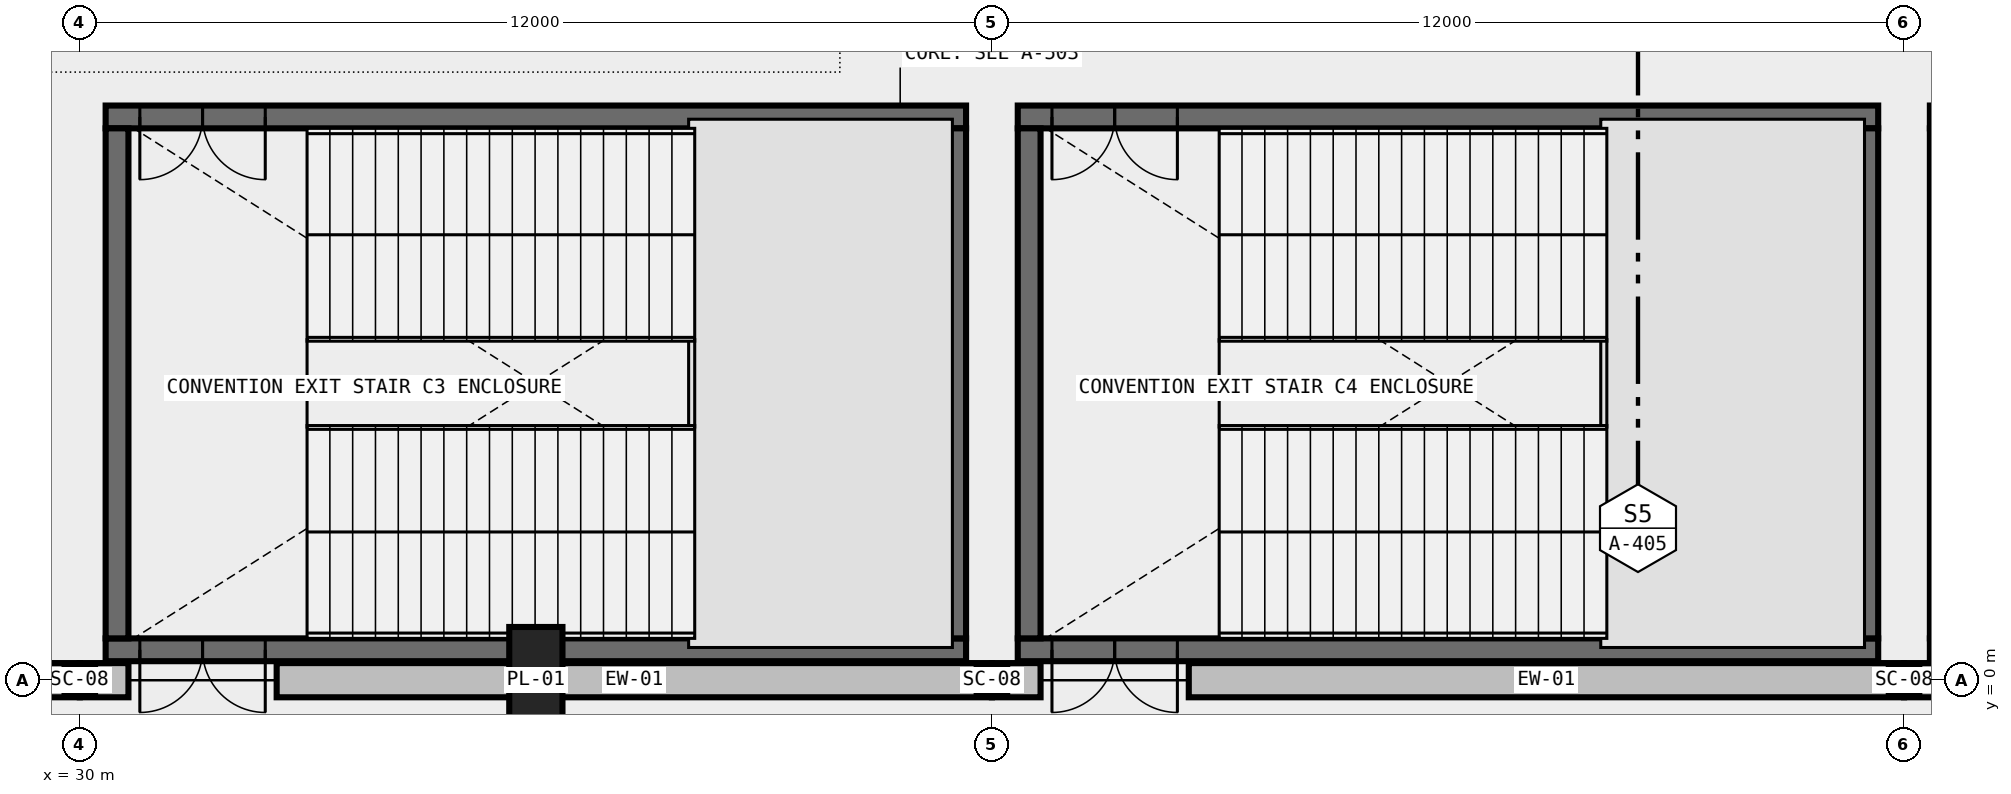
"""IFC4 building model, lengths in metres.
Left out: names, types, materials, properties, quantities, classifications, styles, units other than length and angle.
Written with IfcOpenShell. Run it as: python <this file> out.ifc"""

import sys

from ifc_helpers import new_model, si_unit, direction, frame, frame_2d, origin, origin_2d, place, context, subcontext, project, spatial, rectangle, i_section, extrude, element, fill, save


model = new_model("IFC4")
c1 = context("Model", 3, precision=1e-05, world=origin(), true_north=direction((0.0, 1.0)))
c2 = subcontext(c1, "Body", "Model", "MODEL_VIEW")
j1 = project(units=[si_unit("LENGTHUNIT", "METRE"), si_unit("PLANEANGLEUNIT", "RADIAN")], contexts=[c1])
p1 = place(None, origin())
s1 = spatial("IfcSite", under=j1, at=p1, CompositionType="ELEMENT")
p2 = place(p1, origin())
s2 = spatial("IfcBuilding", under=s1, at=p2, CompositionType="ELEMENT")
p3 = place(p2, origin())
s3 = spatial("IfcBuildingStorey", under=s2, at=p3, CompositionType="ELEMENT", Elevation=0.0)
for number, where, z_axis, x_axis in (
    (1, (30.0, 0.0, 0.0), (0.0, 0.0, 1.0), (1.0, 0.0, 0.0)),
    (2, (42.0, 0.0, 0.0), (0.0, 0.0, 1.0), (1.0, 0.0, 0.0)),
    (3, (54.0, 0.0, 0.0), (0.0, 0.0, 1.0), (1.0, 0.0, 0.0)),
):
    element("IfcColumn", number, at=place(p3, frame(where, z_axis=z_axis, x_axis=x_axis)), inside=s3, PredefinedType="COLUMN", context=c2, shape_type="SweptSolid", body=[
        extrude(i_section(OverallWidth=0.401, OverallDepth=0.399, WebThickness=0.025, FlangeThickness=0.04, FilletRadius=0.031, at=origin_2d()), origin(), (0.0, 0.0, 1.0), 6.0),
    ])
p4 = place(p3, frame((36.0, 0.0, 0.0), z_axis=(0.0, 0.0, 1.0), x_axis=(1.0, 0.0, 0.0)))
e4 = element("IfcColumn", 4, at=p4, inside=s3, PredefinedType="PILASTER", context=c2, shape_type="SweptSolid", body=[
    extrude(rectangle(XDim=0.7, YDim=1.4, at=origin_2d()), origin(), (0.0, 0.0, 1.0), 6.0),
])
p5 = place(p3, frame((41.66, 0.4, 0.0), z_axis=(0.0, 0.0, 1.0), x_axis=(-1.0, 0.0, 0.0)))
e5 = element("IfcWall", 5, at=p5, inside=s3, PredefinedType="SHEAR", context=c2, shape_type="SweptSolid", body=[
    extrude(rectangle(XDim=11.32, YDim=0.3, at=frame_2d((5.66, 0.0))), origin(), (0.0, 0.0, 1.0), 6.0),
])
p6 = place(p5, frame((9.22, 0.0, 0.0)))
e6 = element("IfcOpeningElement", 6, at=p6, cuts=e5, PredefinedType="OPENING", context=c2, shape_type="SweptSolid", body=[
    extrude(rectangle(XDim=1.65, YDim=2.25, at=frame_2d((0.825, 1.125))), frame((0.0, 0.165, 0.0), z_axis=(0.0, -1.0, 0.0), x_axis=(1.0, 0.0, 0.0)), (0.0, 0.0, 1.0), 0.33),
])
p7 = place(p3, frame((41.66, 7.41, 0.0), z_axis=(0.0, 0.0, 1.0), x_axis=(-1.0, 0.0, 0.0)))
e7 = element("IfcWall", 7, at=p7, inside=s3, PredefinedType="SHEAR", context=c2, shape_type="SweptSolid", body=[
    extrude(rectangle(XDim=11.32, YDim=0.3, at=frame_2d((5.66, 0.0))), origin(), (0.0, 0.0, 1.0), 6.0),
])
p8 = place(p7, frame((9.22, 0.0, 0.0)))
e8 = element("IfcOpeningElement", 8, at=p8, cuts=e7, PredefinedType="OPENING", context=c2, shape_type="SweptSolid", body=[
    extrude(rectangle(XDim=1.65, YDim=2.25, at=frame_2d((0.825, 1.125))), frame((0.0, 0.165, 0.0), z_axis=(0.0, -1.0, 0.0), x_axis=(1.0, 0.0, 0.0)), (0.0, 0.0, 1.0), 0.33),
])
for number, where, z_axis, x_axis in (
    (9, (30.49, 7.26, 0.0), (0.0, 0.0, 1.0), (0.0, -1.0, 0.0)),
    (10, (41.51, 0.55, 0.0), (0.0, 0.0, 1.0), (0.0, 1.0, 0.0)),
):
    element("IfcWall", number, at=place(p3, frame(where, z_axis=z_axis, x_axis=x_axis)), inside=s3, PredefinedType="SHEAR", context=c2, shape_type="SweptSolid", body=[
        extrude(rectangle(XDim=6.71, YDim=0.3, at=frame_2d((3.355, 0.0))), origin(), (0.0, 0.0, 1.0), 6.0),
    ])
p9 = place(p3, frame((53.66, 0.4, 0.0), z_axis=(0.0, 0.0, 1.0), x_axis=(-1.0, 0.0, 0.0)))
e11 = element("IfcWall", 11, at=p9, inside=s3, PredefinedType="SHEAR", context=c2, shape_type="SweptSolid", body=[
    extrude(rectangle(XDim=11.32, YDim=0.3, at=frame_2d((5.66, 0.0))), origin(), (0.0, 0.0, 1.0), 6.0),
])
p10 = place(p9, frame((9.22, 0.0, 0.0)))
e12 = element("IfcOpeningElement", 12, at=p10, cuts=e11, PredefinedType="OPENING", context=c2, shape_type="SweptSolid", body=[
    extrude(rectangle(XDim=1.65, YDim=2.25, at=frame_2d((0.825, 1.125))), frame((0.0, 0.165, 0.0), z_axis=(0.0, -1.0, 0.0), x_axis=(1.0, 0.0, 0.0)), (0.0, 0.0, 1.0), 0.33),
])
p11 = place(p3, frame((53.66, 7.41, 0.0), z_axis=(0.0, 0.0, 1.0), x_axis=(-1.0, 0.0, 0.0)))
e13 = element("IfcWall", 13, at=p11, inside=s3, PredefinedType="SHEAR", context=c2, shape_type="SweptSolid", body=[
    extrude(rectangle(XDim=11.32, YDim=0.3, at=frame_2d((5.66, 0.0))), origin(), (0.0, 0.0, 1.0), 6.0),
])
p12 = place(p11, frame((9.22, 0.0, 0.0)))
e14 = element("IfcOpeningElement", 14, at=p12, cuts=e13, PredefinedType="OPENING", context=c2, shape_type="SweptSolid", body=[
    extrude(rectangle(XDim=1.65, YDim=2.25, at=frame_2d((0.825, 1.125))), frame((0.0, 0.165, 0.0), z_axis=(0.0, -1.0, 0.0), x_axis=(1.0, 0.0, 0.0)), (0.0, 0.0, 1.0), 0.33),
])
for number, where, z_axis, x_axis in (
    (15, (42.49, 7.26, 0.0), (0.0, 0.0, 1.0), (0.0, -1.0, 0.0)),
    (16, (53.51, 0.55, 0.0), (0.0, 0.0, 1.0), (0.0, 1.0, 0.0)),
):
    element("IfcWall", number, at=place(p3, frame(where, z_axis=z_axis, x_axis=x_axis)), inside=s3, PredefinedType="SHEAR", context=c2, shape_type="SweptSolid", body=[
        extrude(rectangle(XDim=6.71, YDim=0.3, at=frame_2d((3.355, 0.0))), origin(), (0.0, 0.0, 1.0), 6.0),
    ])
p13 = place(p3, frame((65.66, 0.4, 0.0), z_axis=(0.0, 0.0, 1.0), x_axis=(-1.0, 0.0, 0.0)))
e17 = element("IfcWall", 17, at=p13, inside=s3, PredefinedType="SHEAR", context=c2, shape_type="SweptSolid", body=[
    extrude(rectangle(XDim=11.32, YDim=0.3, at=frame_2d((5.66, 0.0))), origin(), (0.0, 0.0, 1.0), 6.0),
])
p14 = place(p13, frame((9.22, 0.0, 0.0)))
e18 = element("IfcOpeningElement", 18, at=p14, cuts=e17, PredefinedType="OPENING", context=c2, shape_type="SweptSolid", body=[
    extrude(rectangle(XDim=1.65, YDim=2.25, at=frame_2d((0.825, 1.125))), frame((0.0, 0.165, 0.0), z_axis=(0.0, -1.0, 0.0), x_axis=(1.0, 0.0, 0.0)), (0.0, 0.0, 1.0), 0.33),
])
p15 = place(p3, frame((65.66, 7.41, 0.0), z_axis=(0.0, 0.0, 1.0), x_axis=(-1.0, 0.0, 0.0)))
e19 = element("IfcWall", 19, at=p15, inside=s3, PredefinedType="SHEAR", context=c2, shape_type="SweptSolid", body=[
    extrude(rectangle(XDim=11.32, YDim=0.3, at=frame_2d((5.66, 0.0))), origin(), (0.0, 0.0, 1.0), 6.0),
])
p16 = place(p15, frame((9.22, 0.0, 0.0)))
e20 = element("IfcOpeningElement", 20, at=p16, cuts=e19, PredefinedType="OPENING", context=c2, shape_type="SweptSolid", body=[
    extrude(rectangle(XDim=1.65, YDim=2.25, at=frame_2d((0.825, 1.125))), frame((0.0, 0.165, 0.0), z_axis=(0.0, -1.0, 0.0), x_axis=(1.0, 0.0, 0.0)), (0.0, 0.0, 1.0), 0.33),
])
p17 = place(p3, frame((54.49, 7.26, 0.0), z_axis=(0.0, 0.0, 1.0), x_axis=(0.0, -1.0, 0.0)))
e21 = element("IfcWall", 21, at=p17, inside=s3, PredefinedType="SHEAR", context=c2, shape_type="SweptSolid", body=[
    extrude(rectangle(XDim=6.71, YDim=0.3, at=frame_2d((3.355, 0.0))), origin(), (0.0, 0.0, 1.0), 6.0),
])
p18 = place(p3, frame((24.0, 0.0, 0.0), z_axis=(0.0, 0.0, 1.0), x_axis=(1.0, 0.0, 0.0)))
e22 = element("IfcWall", 22, at=p18, inside=s3, PredefinedType="STANDARD", context=c2, shape_type="SweptSolid", body=[
    extrude(rectangle(XDim=6.0, YDim=0.45, at=frame_2d((3.0, 0.0))), origin(), (0.0, 0.0, 1.0), 4.676),
])
p19 = place(p3, frame((30.0, 0.0, 0.0), z_axis=(0.0, 0.0, 1.0), x_axis=(1.0, 0.0, 0.0)))
e23 = element("IfcWall", 23, at=p19, inside=s3, PredefinedType="STANDARD", context=c2, shape_type="SweptSolid", body=[
    extrude(rectangle(XDim=0.64, YDim=0.45, at=frame_2d((0.32, 0.0))), origin(), (0.0, 0.0, 1.0), 4.676),
])
p20 = place(p3, frame((32.59, 0.0, 0.0), z_axis=(0.0, 0.0, 1.0), x_axis=(1.0, 0.0, 0.0)))
e24 = element("IfcWall", 24, at=p20, inside=s3, PredefinedType="STANDARD", context=c2, shape_type="SweptSolid", body=[
    extrude(rectangle(XDim=9.41, YDim=0.45, at=frame_2d((4.705, 0.0))), origin(), (0.0, 0.0, 1.0), 4.676),
])
p21 = place(p3, frame((42.0, 0.0, 0.0), z_axis=(0.0, 0.0, 1.0), x_axis=(1.0, 0.0, 0.0)))
e25 = element("IfcWall", 25, at=p21, inside=s3, PredefinedType="STANDARD", context=c2, shape_type="SweptSolid", body=[
    extrude(rectangle(XDim=0.64, YDim=0.45, at=frame_2d((0.32, 0.0))), origin(), (0.0, 0.0, 1.0), 4.676),
])
p22 = place(p3, frame((44.59, 0.0, 0.0), z_axis=(0.0, 0.0, 1.0), x_axis=(1.0, 0.0, 0.0)))
e26 = element("IfcWall", 26, at=p22, inside=s3, PredefinedType="STANDARD", context=c2, shape_type="SweptSolid", body=[
    extrude(rectangle(XDim=9.41, YDim=0.45, at=frame_2d((4.705, 0.0))), origin(), (0.0, 0.0, 1.0), 4.676),
])
p23 = place(p3, frame((54.0, 0.0, 0.0), z_axis=(0.0, 0.0, 1.0), x_axis=(1.0, 0.0, 0.0)))
e27 = element("IfcWall", 27, at=p23, inside=s3, PredefinedType="STANDARD", context=c2, shape_type="SweptSolid", body=[
    extrude(rectangle(XDim=0.64, YDim=0.45, at=frame_2d((0.32, 0.0))), origin(), (0.0, 0.0, 1.0), 4.676),
])
p24 = place(p8, origin())
e28 = element("IfcDoor", 28, at=p24, inside=s3, OperationType="DOUBLE_DOOR_SINGLE_SWING", PredefinedType="DOOR", context=c2, shape_type="SweptSolid", body=[
    extrude(rectangle(XDim=1.65, YDim=2.25, at=frame_2d((0.825, 1.125))), frame((0.0, 0.025, 0.0), z_axis=(0.0, -1.0, 0.0), x_axis=(1.0, 0.0, 0.0)), (0.0, 0.0, 1.0), 0.05),
])
fill(e8, e28)
p25 = place(p6, origin())
e29 = element("IfcDoor", 29, at=p25, inside=s3, OperationType="DOUBLE_DOOR_SINGLE_SWING", PredefinedType="DOOR", context=c2, shape_type="SweptSolid", body=[
    extrude(rectangle(XDim=1.65, YDim=2.25, at=frame_2d((0.825, 1.125))), frame((0.0, 0.025, 0.0), z_axis=(0.0, -1.0, 0.0), x_axis=(1.0, 0.0, 0.0)), (0.0, 0.0, 1.0), 0.05),
])
fill(e6, e29)
p26 = place(p12, origin())
e30 = element("IfcDoor", 30, at=p26, inside=s3, OperationType="DOUBLE_DOOR_SINGLE_SWING", PredefinedType="DOOR", context=c2, shape_type="SweptSolid", body=[
    extrude(rectangle(XDim=1.65, YDim=2.25, at=frame_2d((0.825, 1.125))), frame((0.0, 0.025, 0.0), z_axis=(0.0, -1.0, 0.0), x_axis=(1.0, 0.0, 0.0)), (0.0, 0.0, 1.0), 0.05),
])
fill(e14, e30)
p27 = place(p10, origin())
e31 = element("IfcDoor", 31, at=p27, inside=s3, OperationType="DOUBLE_DOOR_SINGLE_SWING", PredefinedType="DOOR", context=c2, shape_type="SweptSolid", body=[
    extrude(rectangle(XDim=1.65, YDim=2.25, at=frame_2d((0.825, 1.125))), frame((0.0, 0.025, 0.0), z_axis=(0.0, -1.0, 0.0), x_axis=(1.0, 0.0, 0.0)), (0.0, 0.0, 1.0), 0.05),
])
fill(e12, e31)
save(model, sys.argv[1])
